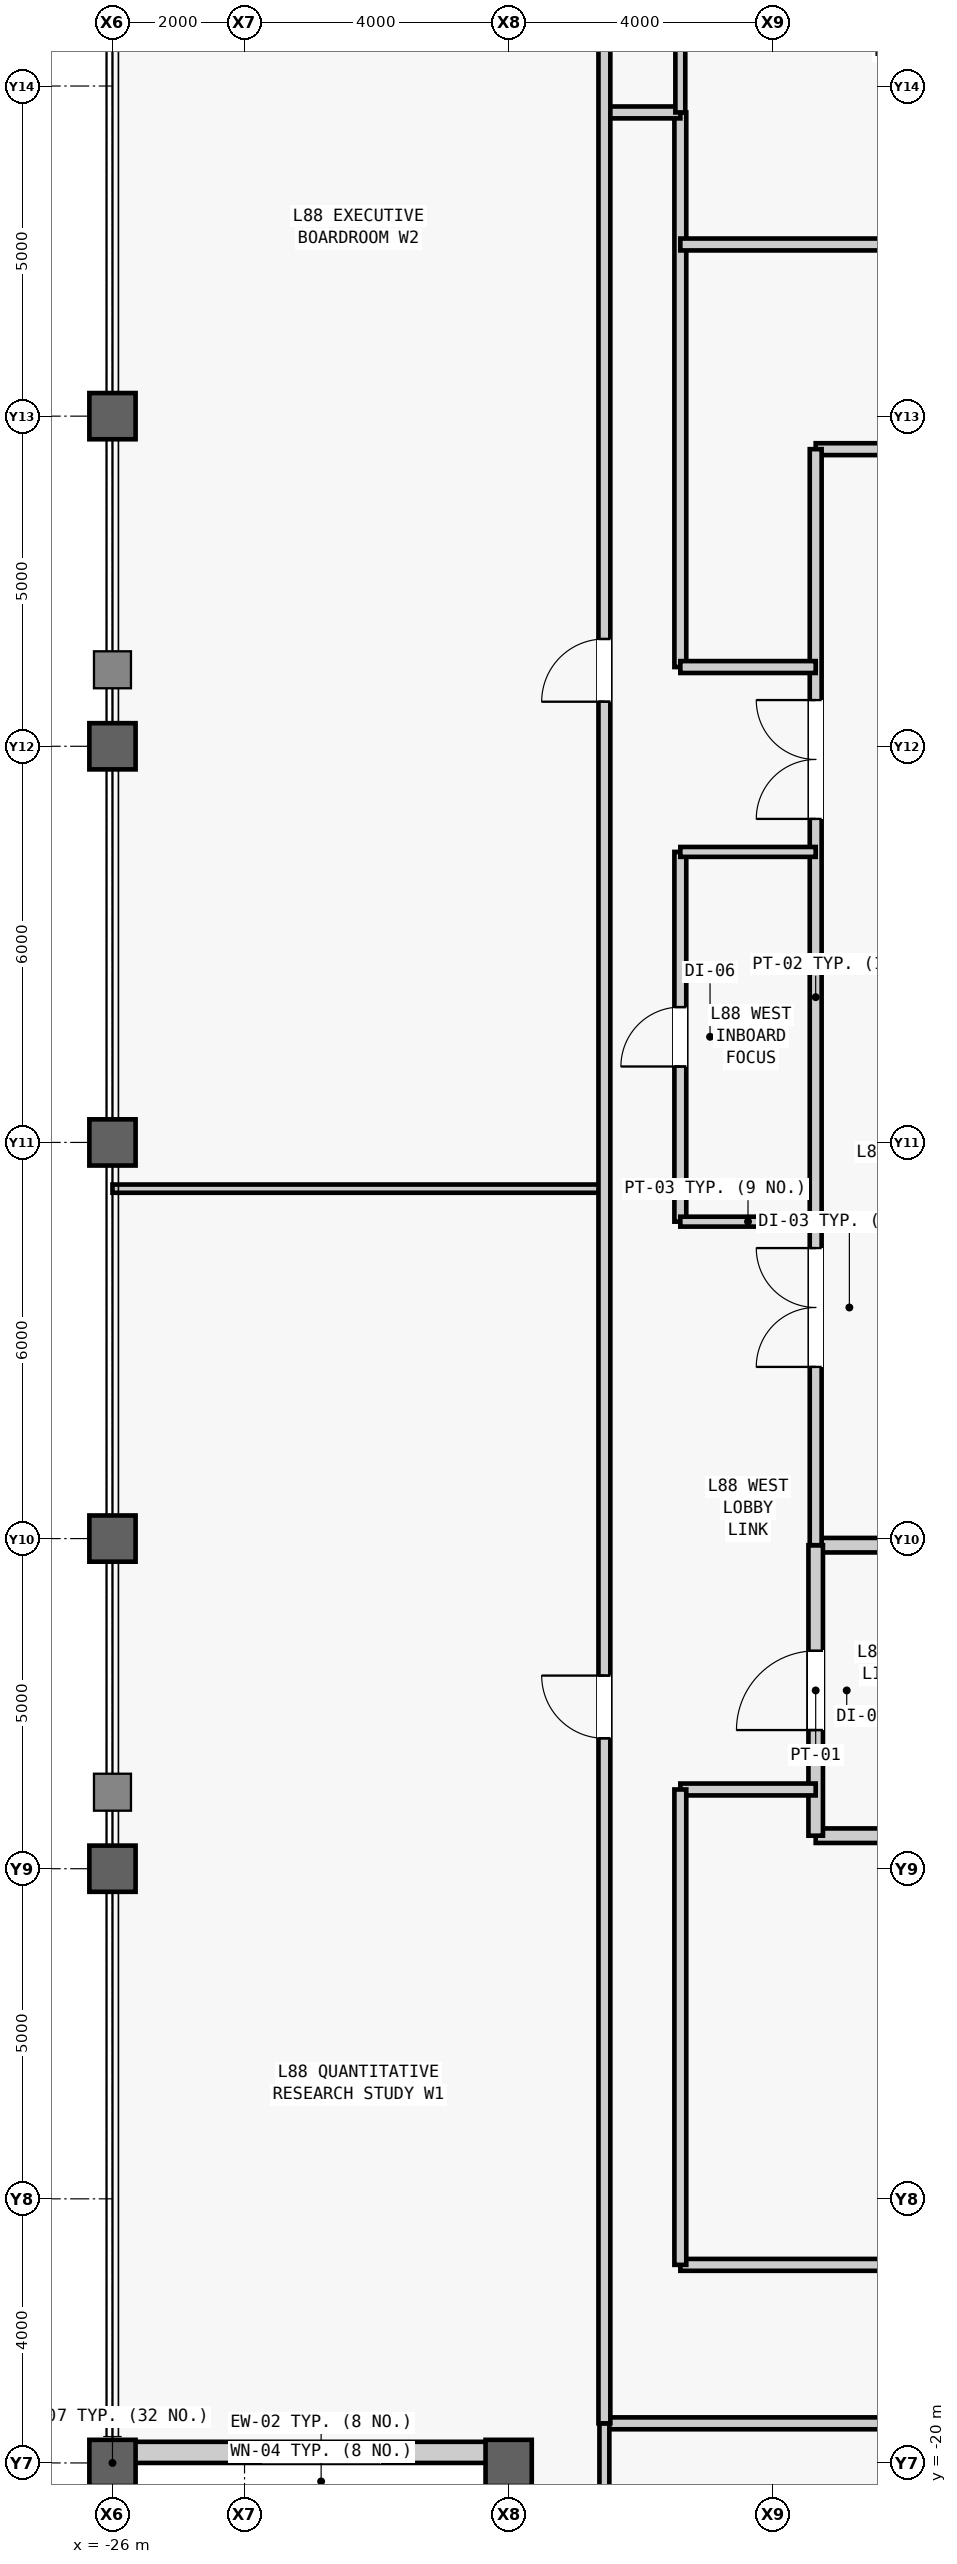
"""IFC4 building model, lengths in metres.
Left out: names, types, materials, properties, quantities, classifications, styles, units other than length and angle.
Written with IfcOpenShell. Run it as: python <this file> out.ifc"""

import sys

from ifc_helpers import new_model, si_unit, direction, frame, frame_2d, origin, origin_2d, place, context, subcontext, project, spatial, rectangle, hollow_rectangle, extrude, source, transform, mapped, element, fill, save


model = new_model("IFC4")
c1 = context("Model", 3, precision=1e-05, world=origin(), true_north=direction((0.0, 1.0)))
c2 = subcontext(c1, "Body", "Model", "MODEL_VIEW")
j1 = project(units=[si_unit("LENGTHUNIT", "METRE"), si_unit("PLANEANGLEUNIT", "RADIAN")], contexts=[c1])
p1 = place(None, origin())
s1 = spatial("IfcSite", under=j1, at=p1, CompositionType="ELEMENT")
p2 = place(p1, origin())
s2 = spatial("IfcBuilding", under=s1, at=p2, CompositionType="ELEMENT")
p3 = place(p2, frame((0.0, 0.0, 370.3)))
s3 = spatial("IfcBuildingStorey", under=s2, at=p3, CompositionType="ELEMENT", Elevation=370.3)
m1 = source(origin(), c2, "Body", "SweptSolid", [
    extrude(hollow_rectangle(XDim=0.7, YDim=0.7, WallThickness=0.04, at=origin_2d()), origin(), (0.0, 0.0, 1.0), 5.2),
])
for number, where, z_axis, x_axis in (
    (1, (-26.0, -20.0, 0.0), (0.0, 0.0, 1.0), (1.0, 0.0, 0.0)),
    (2, (-26.0, -11.0, 0.0), (0.0, 0.0, 1.0), (1.0, 0.0, 0.0)),
    (3, (-26.0, -6.0, 0.0), (0.0, 0.0, 1.0), (1.0, 0.0, 0.0)),
    (4, (-26.0, 0.0, 0.0), (0.0, 0.0, 1.0), (1.0, 0.0, 0.0)),
    (5, (-26.0, 6.0, 0.0), (0.0, 0.0, 1.0), (1.0, 0.0, 0.0)),
    (6, (-26.0, 11.0, 0.0), (0.0, 0.0, 1.0), (1.0, 0.0, 0.0)),
    (7, (-20.0, -20.0, 0.0), (0.0, 0.0, 1.0), (1.0, 0.0, 0.0)),
):
    element("IfcColumn", number, at=place(p3, frame(where, z_axis=z_axis, x_axis=x_axis)), inside=s3, PredefinedType="COLUMN", context=c2, shape_type="MappedRepresentation", body=[
        mapped(m1, transform((0.0, 0.0, 0.0), scale=1.0)),
    ])
m2 = source(origin(), c2, "Body", "SweptSolid", [
    extrude(rectangle(XDim=5.68, YDim=0.32, at=frame_2d((2.84, 0.0))), origin(), (0.0, 0.0, 1.0), 4.051),
])
p4 = place(p3, frame((-20.0, -19.84, 0.0), z_axis=(0.0, 0.0, 1.0), x_axis=(-1.0, 0.0, 0.0)))
e8 = element("IfcWall", 8, at=p4, inside=s3, PredefinedType="STANDARD", context=c2, shape_type="MappedRepresentation", body=[
    mapped(m2, transform((0.0, 0.0, 0.0), scale=1.0)),
])
m3 = source(origin(), c2, "Body", "SweptSolid", [
    extrude(rectangle(XDim=1.8, YDim=2.4, at=frame_2d((0.9, 1.2))), frame((0.0, 0.17, 0.0), z_axis=(0.0, -1.0, 0.0), x_axis=(1.0, 0.0, 0.0)), (0.0, 0.0, 1.0), 0.34),
])
p5 = place(p4, frame((1.94, 0.0, 0.7)))
e9 = element("IfcOpeningElement", 9, at=p5, cuts=e8, PredefinedType="OPENING", context=c2, shape_type="MappedRepresentation", body=[
    mapped(m3, transform((0.0, 0.0, 0.0), scale=1.0)),
])
p6 = place(p3, frame((-19.84, -25.68, 0.0), z_axis=(0.0, 0.0, 1.0), x_axis=(0.0, 1.0, 0.0)))
e10 = element("IfcWall", 10, at=p6, inside=s3, PredefinedType="STANDARD", context=c2, shape_type="MappedRepresentation", body=[
    mapped(m2, transform((0.0, 0.0, 0.0), scale=1.0)),
])
p7 = place(p6, frame((1.94, 0.0, 0.7)))
e11 = element("IfcOpeningElement", 11, at=p7, cuts=e10, PredefinedType="OPENING", context=c2, shape_type="MappedRepresentation", body=[
    mapped(m3, transform((0.0, 0.0, 0.0), scale=1.0)),
])
m4 = source(origin(), c2, "Body", "SweptSolid", [
    extrude(rectangle(XDim=4.05, YDim=0.22, at=frame_2d((2.025, 0.0))), origin(), (0.0, 0.0, 1.0), 4.6),
])
p8 = place(p3, frame((-15.35, -10.5, 0.0), z_axis=(0.0, 0.0, 1.0), x_axis=(1.0, 0.0, 0.0)))
e12 = element("IfcWall", 12, at=p8, inside=s3, PredefinedType="PARTITIONING", context=c2, shape_type="MappedRepresentation", body=[
    mapped(m4, transform((0.0, 0.0, 0.0), scale=1.0)),
])
m5 = source(origin(), c2, "Body", "SweptSolid", [
    extrude(rectangle(XDim=4.05, YDim=0.22, at=frame_2d((2.025, 0.0))), origin(), (0.0, 0.0, 1.0), 2.8),
])
p9 = place(p3, frame((-15.35, -6.1, 0.0), z_axis=(0.0, 0.0, 1.0), x_axis=(1.0, 0.0, 0.0)))
e13 = element("IfcWall", 13, at=p9, inside=s3, PredefinedType="PARTITIONING", context=c2, shape_type="MappedRepresentation", body=[
    mapped(m5, transform((0.0, 0.0, 0.0), scale=1.0)),
])
m6 = source(origin(), c2, "Body", "SweptSolid", [
    extrude(rectangle(XDim=4.4, YDim=0.22, at=frame_2d((2.2, 0.0))), origin(), (0.0, 0.0, 1.0), 4.6),
])
p10 = place(p3, frame((-15.35, -10.5, 0.0), z_axis=(0.0, 0.0, 1.0), x_axis=(0.0, 1.0, 0.0)))
e14 = element("IfcWall", 14, at=p10, inside=s3, PredefinedType="PARTITIONING", context=c2, shape_type="MappedRepresentation", body=[
    mapped(m6, transform((0.0, 0.0, 0.0), scale=1.0)),
])
m7 = source(origin(), c2, "Body", "SweptSolid", [
    extrude(rectangle(XDim=1.2, YDim=2.2, at=frame_2d((0.6, 1.1))), frame((0.0, 0.12, 0.0), z_axis=(0.0, -1.0, 0.0), x_axis=(1.0, 0.0, 0.0)), (0.0, 0.0, 1.0), 0.24),
])
p11 = place(p10, frame((1.6, 0.0, 0.0)))
e15 = element("IfcOpeningElement", 15, at=p11, cuts=e14, PredefinedType="OPENING", context=c2, shape_type="MappedRepresentation", body=[
    mapped(m7, transform((0.0, 0.0, 0.0), scale=1.0)),
])
m8 = source(origin(), c2, "Body", "SweptSolid", [
    extrude(rectangle(XDim=4.05, YDim=0.18, at=frame_2d((2.025, 0.0))), origin(), (0.0, 0.0, 1.0), 4.6),
])
p12 = place(p3, frame((-15.35, 10.5, 0.0), z_axis=(0.0, 0.0, 1.0), x_axis=(1.0, 0.0, 0.0)))
e16 = element("IfcWall", 16, at=p12, inside=s3, PredefinedType="PARTITIONING", context=c2, shape_type="MappedRepresentation", body=[
    mapped(m8, transform((0.0, 0.0, 0.0), scale=1.0)),
])
m9 = source(origin(), c2, "Body", "SweptSolid", [
    extrude(rectangle(XDim=16.6, YDim=0.18, at=frame_2d((8.3, 0.0))), origin(), (0.0, 0.0, 1.0), 4.6),
])
p13 = place(p3, frame((-15.35, -6.1, 0.0), z_axis=(0.0, 0.0, 1.0), x_axis=(0.0, 1.0, 0.0)))
e17 = element("IfcWall", 17, at=p13, inside=s3, PredefinedType="PARTITIONING", context=c2, shape_type="MappedRepresentation", body=[
    mapped(m9, transform((0.0, 0.0, 0.0), scale=1.0)),
])
m10 = source(origin(), c2, "Body", "SweptSolid", [
    extrude(rectangle(XDim=1.8, YDim=2.25, at=frame_2d((0.9, 1.125))), frame((0.0, 0.1, 0.0), z_axis=(0.0, -1.0, 0.0), x_axis=(1.0, 0.0, 0.0)), (0.0, 0.0, 1.0), 0.2),
])
p14 = place(p13, frame((2.7, 0.0, 0.0)))
e18 = element("IfcOpeningElement", 18, at=p14, cuts=e17, PredefinedType="OPENING", context=c2, shape_type="MappedRepresentation", body=[
    mapped(m10, transform((0.0, 0.0, 0.0), scale=1.0)),
])
p15 = place(p13, frame((11.0, 0.0, 0.0)))
e19 = element("IfcOpeningElement", 19, at=p15, cuts=e17, PredefinedType="OPENING", context=c2, shape_type="MappedRepresentation", body=[
    mapped(m10, transform((0.0, 0.0, 0.0), scale=1.0)),
])
m11 = source(origin(), c2, "Body", "SweptSolid", [
    extrude(rectangle(XDim=5.6, YDim=0.18, at=frame_2d((2.8, 0.0))), origin(), (0.0, 0.0, 1.0), 4.6),
])
p16 = place(p3, frame((-17.4, -1.2, 0.0), z_axis=(0.0, 0.0, 1.0), x_axis=(0.0, 1.0, 0.0)))
e20 = element("IfcWall", 20, at=p16, inside=s3, PredefinedType="PARTITIONING", context=c2, shape_type="MappedRepresentation", body=[
    mapped(m11, transform((0.0, 0.0, 0.0), scale=1.0)),
])
m12 = source(origin(), c2, "Body", "SweptSolid", [
    extrude(rectangle(XDim=0.9, YDim=2.15, at=frame_2d((0.45, 1.075))), frame((0.0, 0.1, 0.0), z_axis=(0.0, -1.0, 0.0), x_axis=(1.0, 0.0, 0.0)), (0.0, 0.0, 1.0), 0.2),
])
p17 = place(p16, frame((2.35, 0.0, 0.0)))
e21 = element("IfcOpeningElement", 21, at=p17, cuts=e20, PredefinedType="OPENING", context=c2, shape_type="MappedRepresentation", body=[
    mapped(m12, transform((0.0, 0.0, 0.0), scale=1.0)),
])
m13 = source(origin(), c2, "Body", "SweptSolid", [
    extrude(rectangle(XDim=2.05, YDim=0.15, at=frame_2d((1.025, 0.0))), origin(), (0.0, 0.0, 1.0), 4.6),
])
for number, where, z_axis, x_axis in (
    (22, (-17.4, -1.2, 0.0), (0.0, 0.0, 1.0), (1.0, 0.0, 0.0)),
    (23, (-17.4, 4.4, 0.0), (0.0, 0.0, 1.0), (1.0, 0.0, 0.0)),
):
    element("IfcWall", number, at=place(p3, frame(where, z_axis=z_axis, x_axis=x_axis)), inside=s3, PredefinedType="PARTITIONING", context=c2, shape_type="MappedRepresentation", body=[
        mapped(m13, transform((0.0, 0.0, 0.0), scale=1.0)),
    ])
m14 = source(origin(), c2, "Body", "SweptSolid", [
    extrude(rectangle(XDim=2.05, YDim=0.18, at=frame_2d((1.025, 0.0))), origin(), (0.0, 0.0, 1.0), 4.6),
])
p18 = place(p3, frame((-17.4, -9.8, 0.0), z_axis=(0.0, 0.0, 1.0), x_axis=(1.0, 0.0, 0.0)))
e24 = element("IfcWall", 24, at=p18, inside=s3, PredefinedType="PARTITIONING", context=c2, shape_type="MappedRepresentation", body=[
    mapped(m14, transform((0.0, 0.0, 0.0), scale=1.0)),
])
m15 = source(origin(), c2, "Body", "SweptSolid", [
    extrude(rectangle(XDim=8.4, YDim=0.18, at=frame_2d((4.2, 0.0))), origin(), (0.0, 0.0, 1.0), 4.6),
])
p19 = place(p3, frame((-17.4, 7.2, 0.0), z_axis=(0.0, 0.0, 1.0), x_axis=(0.0, 1.0, 0.0)))
e25 = element("IfcWall", 25, at=p19, inside=s3, PredefinedType="PARTITIONING", context=c2, shape_type="MappedRepresentation", body=[
    mapped(m15, transform((0.0, 0.0, 0.0), scale=1.0)),
])
p20 = place(p3, frame((-17.4, 7.2, 0.0), z_axis=(0.0, 0.0, 1.0), x_axis=(1.0, 0.0, 0.0)))
e26 = element("IfcWall", 26, at=p20, inside=s3, PredefinedType="PARTITIONING", context=c2, shape_type="MappedRepresentation", body=[
    mapped(m14, transform((0.0, 0.0, 0.0), scale=1.0)),
])
m16 = source(origin(), c2, "Body", "SweptSolid", [
    extrude(rectangle(XDim=16.1, YDim=0.18, at=frame_2d((8.05, 0.0))), origin(), (0.0, 0.0, 1.0), 4.6),
])
p21 = place(p3, frame((-17.4, -17.0, 0.0), z_axis=(0.0, 0.0, 1.0), x_axis=(1.0, 0.0, 0.0)))
e27 = element("IfcWall", 27, at=p21, inside=s3, PredefinedType="PARTITIONING", context=c2, shape_type="MappedRepresentation", body=[
    mapped(m16, transform((0.0, 0.0, 0.0), scale=1.0)),
])
p22 = place(p21, frame((8.95, 0.0, 0.0)))
e28 = element("IfcOpeningElement", 28, at=p22, cuts=e27, PredefinedType="OPENING", context=c2, shape_type="MappedRepresentation", body=[
    mapped(m12, transform((0.0, 0.0, 0.0), scale=1.0)),
])
m17 = source(origin(), c2, "Body", "SweptSolid", [
    extrude(rectangle(XDim=7.2, YDim=0.18, at=frame_2d((3.6, 0.0))), origin(), (0.0, 0.0, 1.0), 4.6),
])
p23 = place(p3, frame((-17.4, -17.0, 0.0), z_axis=(0.0, 0.0, 1.0), x_axis=(0.0, 1.0, 0.0)))
e29 = element("IfcWall", 29, at=p23, inside=s3, PredefinedType="PARTITIONING", context=c2, shape_type="MappedRepresentation", body=[
    mapped(m17, transform((0.0, 0.0, 0.0), scale=1.0)),
])
m18 = source(origin(), c2, "Body", "SweptSolid", [
    extrude(rectangle(XDim=1.15, YDim=0.18, at=frame_2d((0.575, 0.0))), origin(), (0.0, 0.0, 1.0), 4.6),
])
p24 = place(p3, frame((-18.55, 15.6, 0.0), z_axis=(0.0, 0.0, 1.0), x_axis=(1.0, 0.0, 0.0)))
e30 = element("IfcWall", 30, at=p24, inside=s3, PredefinedType="PARTITIONING", context=c2, shape_type="MappedRepresentation", body=[
    mapped(m18, transform((0.0, 0.0, 0.0), scale=1.0)),
])
m19 = source(origin(), c2, "Body", "SweptSolid", [
    extrude(rectangle(XDim=36.3, YDim=0.18, at=frame_2d((18.15, 0.0))), origin(), (0.0, 0.0, 1.0), 4.253),
])
p25 = place(p3, frame((-18.55, -19.4, 0.0), z_axis=(0.0, 0.0, 1.0), x_axis=(1.0, 0.0, 0.0)))
e31 = element("IfcWall", 31, at=p25, inside=s3, PredefinedType="PARTITIONING", context=c2, shape_type="MappedRepresentation", body=[
    mapped(m19, transform((0.0, 0.0, 0.0), scale=1.0)),
])
m20 = source(origin(), c2, "Body", "SweptSolid", [
    extrude(rectangle(XDim=1.05, YDim=2.2, at=frame_2d((0.525, 1.1))), frame((0.0, 0.1, 0.0), z_axis=(0.0, -1.0, 0.0), x_axis=(1.0, 0.0, 0.0)), (0.0, 0.0, 1.0), 0.2),
])
p26 = place(p25, frame((6.872, 0.0, 0.0)))
e32 = element("IfcOpeningElement", 32, at=p26, cuts=e31, PredefinedType="OPENING", context=c2, shape_type="MappedRepresentation", body=[
    mapped(m20, transform((0.0, 0.0, 0.0), scale=1.0)),
])
p27 = place(p25, frame((19.44, 0.0, 0.0)))
e33 = element("IfcOpeningElement", 33, at=p27, cuts=e31, PredefinedType="OPENING", context=c2, shape_type="MappedRepresentation", body=[
    mapped(m20, transform((0.0, 0.0, 0.0), scale=1.0)),
])
p28 = place(p25, frame((30.168, 0.0, 0.0)))
e34 = element("IfcOpeningElement", 34, at=p28, cuts=e31, PredefinedType="OPENING", context=c2, shape_type="MappedRepresentation", body=[
    mapped(m20, transform((0.0, 0.0, 0.0), scale=1.0)),
])
m21 = source(origin(), c2, "Body", "SweptSolid", [
    extrude(rectangle(XDim=6.6, YDim=0.15, at=frame_2d((3.3, 0.0))), origin(), (0.0, 0.0, 1.0), 4.6),
])
p29 = place(p3, frame((-18.55, -26.0, 0.0), z_axis=(0.0, 0.0, 1.0), x_axis=(0.0, 1.0, 0.0)))
e35 = element("IfcWall", 35, at=p29, inside=s3, PredefinedType="PARTITIONING", context=c2, shape_type="MappedRepresentation", body=[
    mapped(m21, transform((0.0, 0.0, 0.0), scale=1.0)),
])
m22 = source(origin(), c2, "Body", "SweptSolid", [
    extrude(rectangle(XDim=32.75, YDim=0.18, at=frame_2d((16.375, 0.0))), origin(), (0.0, 0.0, 1.0), 4.6),
])
p30 = place(p3, frame((-17.4, 13.6, 0.0), z_axis=(0.0, 0.0, 1.0), x_axis=(1.0, 0.0, 0.0)))
e36 = element("IfcWall", 36, at=p30, inside=s3, PredefinedType="PARTITIONING", context=c2, shape_type="MappedRepresentation", body=[
    mapped(m22, transform((0.0, 0.0, 0.0), scale=1.0)),
])
p31 = place(p30, frame((27.075, 0.0, 0.0)))
e37 = element("IfcOpeningElement", 37, at=p31, cuts=e36, PredefinedType="OPENING", context=c2, shape_type="MappedRepresentation", body=[
    mapped(m20, transform((0.0, 0.0, 0.0), scale=1.0)),
])
m23 = source(origin(), c2, "Body", "SweptSolid", [
    extrude(rectangle(XDim=10.4, YDim=0.15, at=frame_2d((5.2, 0.0))), origin(), (0.0, 0.0, 1.0), 4.6),
])
p32 = place(p3, frame((-17.4, 15.6, 0.0), z_axis=(0.0, 0.0, 1.0), x_axis=(0.0, 1.0, 0.0)))
e38 = element("IfcWall", 38, at=p32, inside=s3, PredefinedType="PARTITIONING", context=c2, shape_type="MappedRepresentation", body=[
    mapped(m23, transform((0.0, 0.0, 0.0), scale=1.0)),
])
m24 = source(origin(), c2, "Body", "SweptSolid", [
    extrude(rectangle(XDim=7.45, YDim=0.125, at=frame_2d((3.725, 0.0))), origin(), (0.0, 0.0, 1.0), 4.6),
])
p33 = place(p3, frame((-26.0, -0.7, 0.0), z_axis=(0.0, 0.0, 1.0), x_axis=(1.0, 0.0, 0.0)))
e39 = element("IfcWall", 39, at=p33, inside=s3, PredefinedType="PARTITIONING", context=c2, shape_type="MappedRepresentation", body=[
    mapped(m24, transform((0.0, 0.0, 0.0), scale=1.0)),
])
m25 = source(origin(), c2, "Body", "SweptSolid", [
    extrude(rectangle(XDim=39.4, YDim=0.18, at=frame_2d((19.7, 0.0))), origin(), (0.0, 0.0, 1.0), 4.6),
])
p34 = place(p3, frame((-18.55, -19.4, 0.0), z_axis=(0.0, 0.0, 1.0), x_axis=(0.0, 1.0, 0.0)))
e40 = element("IfcWall", 40, at=p34, inside=s3, PredefinedType="PARTITIONING", context=c2, shape_type="MappedRepresentation", body=[
    mapped(m25, transform((0.0, 0.0, 0.0), scale=1.0)),
])
m26 = source(origin(), c2, "Body", "SweptSolid", [
    extrude(rectangle(XDim=0.95, YDim=2.15, at=frame_2d((0.475, 1.075))), frame((0.0, 0.1, 0.0), z_axis=(0.0, -1.0, 0.0), x_axis=(1.0, 0.0, 0.0)), (0.0, 0.0, 1.0), 0.2),
])
p35 = place(p34, frame((10.375, 0.0, 0.0)))
e41 = element("IfcOpeningElement", 41, at=p35, cuts=e40, PredefinedType="OPENING", context=c2, shape_type="MappedRepresentation", body=[
    mapped(m26, transform((0.0, 0.0, 0.0), scale=1.0)),
])
p36 = place(p34, frame((26.075, 0.0, 0.0)))
e42 = element("IfcOpeningElement", 42, at=p36, cuts=e40, PredefinedType="OPENING", context=c2, shape_type="MappedRepresentation", body=[
    mapped(m26, transform((0.0, 0.0, 0.0), scale=1.0)),
])
m27 = source(origin(), c2, "Body", "SweptSolid", [
    extrude(rectangle(XDim=1.8, YDim=2.4, at=frame_2d((0.9, 1.2))), frame((0.0, 0.03, 0.0), z_axis=(0.0, -1.0, 0.0), x_axis=(1.0, 0.0, 0.0)), (0.0, 0.0, 1.0), 0.06),
])
p37 = place(p5, origin())
e43 = element("IfcWindow", 43, at=p37, inside=s3, PartitioningType="SINGLE_PANEL", PredefinedType="WINDOW", context=c2, shape_type="MappedRepresentation", body=[
    mapped(m27, transform((0.0, 0.0, 0.0), scale=1.0)),
])
fill(e9, e43)
m28 = source(origin(), c2, "Body", "SweptSolid", [
    extrude(rectangle(XDim=1.2, YDim=2.2, at=frame_2d((0.6, 1.1))), frame((0.0, 0.025, 0.0), z_axis=(0.0, -1.0, 0.0), x_axis=(1.0, 0.0, 0.0)), (0.0, 0.0, 1.0), 0.05),
])
p38 = place(p11, origin())
e44 = element("IfcDoor", 44, at=p38, inside=s3, OperationType="SINGLE_SWING_LEFT", PredefinedType="DOOR", context=c2, shape_type="MappedRepresentation", body=[
    mapped(m28, transform((0.0, 0.0, 0.0), scale=1.0)),
])
fill(e15, e44)
m29 = source(origin(), c2, "Body", "SweptSolid", [
    extrude(rectangle(XDim=1.8, YDim=2.25, at=frame_2d((0.9, 1.125))), frame((0.0, 0.025, 0.0), z_axis=(0.0, -1.0, 0.0), x_axis=(1.0, 0.0, 0.0)), (0.0, 0.0, 1.0), 0.05),
])
p39 = place(p14, origin())
e45 = element("IfcDoor", 45, at=p39, inside=s3, OperationType="SINGLE_SWING_LEFT", PredefinedType="DOOR", context=c2, shape_type="MappedRepresentation", body=[
    mapped(m29, transform((0.0, 0.0, 0.0), scale=1.0)),
])
fill(e18, e45)
p40 = place(p15, origin())
e46 = element("IfcDoor", 46, at=p40, inside=s3, OperationType="SINGLE_SWING_RIGHT", PredefinedType="DOOR", context=c2, shape_type="MappedRepresentation", body=[
    mapped(m29, transform((0.0, 0.0, 0.0), scale=1.0)),
])
fill(e19, e46)
m30 = source(origin(), c2, "Body", "SweptSolid", [
    extrude(rectangle(XDim=0.9, YDim=2.15, at=frame_2d((0.45, 1.075))), frame((0.0, 0.025, 0.0), z_axis=(0.0, -1.0, 0.0), x_axis=(1.0, 0.0, 0.0)), (0.0, 0.0, 1.0), 0.05),
])
p41 = place(p17, origin())
e47 = element("IfcDoor", 47, at=p41, inside=s3, OperationType="SINGLE_SWING_LEFT", PredefinedType="DOOR", context=c2, shape_type="MappedRepresentation", body=[
    mapped(m30, transform((0.0, 0.0, 0.0), scale=1.0)),
])
fill(e21, e47)
m31 = source(origin(), c2, "Body", "SweptSolid", [
    extrude(rectangle(XDim=0.95, YDim=2.15, at=frame_2d((0.475, 1.075))), frame((0.0, 0.025, 0.0), z_axis=(0.0, -1.0, 0.0), x_axis=(1.0, 0.0, 0.0)), (0.0, 0.0, 1.0), 0.05),
])
p42 = place(p35, origin())
e48 = element("IfcDoor", 48, at=p42, inside=s3, OperationType="SINGLE_SWING_RIGHT", PredefinedType="DOOR", context=c2, shape_type="MappedRepresentation", body=[
    mapped(m31, transform((0.0, 0.0, 0.0), scale=1.0)),
])
fill(e41, e48)
p43 = place(p36, origin())
e49 = element("IfcDoor", 49, at=p43, inside=s3, OperationType="SINGLE_SWING_LEFT", PredefinedType="DOOR", context=c2, shape_type="MappedRepresentation", body=[
    mapped(m31, transform((0.0, 0.0, 0.0), scale=1.0)),
])
fill(e42, e49)
save(model, sys.argv[1])
